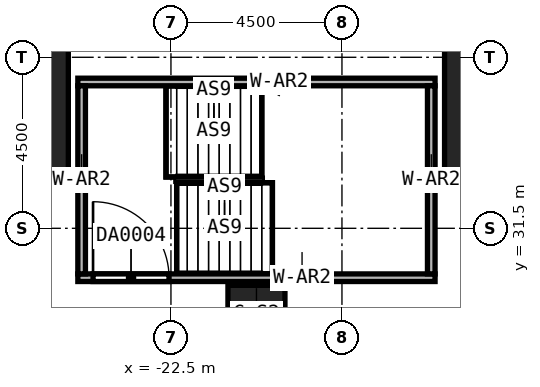
"""IFC4 building model, lengths in metres.
Left out: names, types, materials, properties, quantities, classifications, styles, units other than length and angle.
Written with IfcOpenShell. Run it as: python <this file> out.ifc"""

import sys

from ifc_helpers import new_model, si_unit, direction, frame, frame_2d, origin, origin_2d, place, context, subcontext, project, spatial, rectangle, extrude, element, fill, save


model = new_model("IFC4")
c1 = context("Model", 3, precision=1e-05, world=origin(), true_north=direction((0.0, 1.0)))
c2 = subcontext(c1, "Body", "Model", "MODEL_VIEW")
j1 = project(units=[si_unit("LENGTHUNIT", "METRE"), si_unit("PLANEANGLEUNIT", "RADIAN")], contexts=[c1])
p1 = place(None, origin())
s1 = spatial("IfcSite", under=j1, at=p1, CompositionType="ELEMENT")
p2 = place(p1, origin())
s2 = spatial("IfcBuilding", under=s1, at=p2, CompositionType="ELEMENT")
p3 = place(p2, frame((0.0, 0.0, 25.0)))
s3 = spatial("IfcBuildingStorey", under=s2, at=p3, CompositionType="ELEMENT", Elevation=25.0)
for number, where, z_axis, x_axis in (
    (1, (-27.0, 36.0, 0.0), (0.0, 0.0, 1.0), (1.0, 0.0, 0.0)),
    (2, (-13.5, 36.0, 0.0), (0.0, 0.0, 1.0), (1.0, 0.0, 0.0)),
):
    element("IfcColumn", number, at=place(p3, frame(where, z_axis=z_axis, x_axis=x_axis)), inside=s3, PredefinedType="COLUMN", context=c2, shape_type="SweptSolid", body=[
        extrude(rectangle(XDim=3.6, YDim=6.0, at=origin_2d()), origin(), (0.0, 0.0, 1.0), 6.0),
    ])
p4 = place(p3, frame((-20.25, 29.25, 0.0), z_axis=(0.0, 0.0, 1.0), x_axis=(1.0, 0.0, 0.0)))
e3 = element("IfcColumn", 3, at=p4, inside=s3, PredefinedType="COLUMN", context=c2, shape_type="SweptSolid", body=[
    extrude(rectangle(XDim=1.5, YDim=1.5, at=origin_2d()), origin(), (0.0, 0.0, 1.0), 6.0),
])
p5 = place(p3, frame((-24.95, 30.2, 0.0), z_axis=(0.0, 0.0, 1.0), x_axis=(1.0, 0.0, 0.0)))
e4 = element("IfcWall", 4, at=p5, inside=s3, PredefinedType="SOLIDWALL", context=c2, shape_type="SweptSolid", body=[
    extrude(rectangle(XDim=9.4, YDim=0.2, at=frame_2d((4.7, 0.0))), origin(), (0.0, 0.0, 1.0), 6.0),
])
p6 = place(p5, frame((0.4, 0.0, 0.0)))
e5 = element("IfcOpeningElement", 5, at=p6, cuts=e4, PredefinedType="OPENING", context=c2, shape_type="SweptSolid", body=[
    extrude(rectangle(XDim=2.0, YDim=2.4, at=frame_2d((1.0, 1.2))), frame((0.0, 0.1, 0.0), z_axis=(0.0, -1.0, 0.0), x_axis=(1.0, 0.0, 0.0)), (0.0, 0.0, 1.0), 0.2),
])
p7 = place(p3, frame((-24.95, 35.35, 0.0), z_axis=(0.0, 0.0, 1.0), x_axis=(1.0, 0.0, 0.0)))
e6 = element("IfcWall", 6, at=p7, inside=s3, PredefinedType="SOLIDWALL", context=c2, shape_type="SweptSolid", body=[
    extrude(rectangle(XDim=9.4, YDim=0.2, at=frame_2d((4.7, 0.0))), origin(), (0.0, 0.0, 1.0), 6.0),
])
for number, where, z_axis, x_axis in (
    (7, (-24.85, 30.3, 0.0), (0.0, 0.0, 1.0), (0.0, 1.0, 0.0)),
    (8, (-15.65, 30.3, 0.0), (0.0, 0.0, 1.0), (0.0, 1.0, 0.0)),
):
    element("IfcWall", number, at=place(p3, frame(where, z_axis=z_axis, x_axis=x_axis)), inside=s3, PredefinedType="SOLIDWALL", context=c2, shape_type="SweptSolid", body=[
        extrude(rectangle(XDim=4.95, YDim=0.2, at=frame_2d((2.475, 0.0))), origin(), (0.0, 0.0, 1.0), 6.0),
    ])
p8 = place(p6, origin())
e9 = element("IfcDoor", 9, at=p8, inside=s3, OperationType="DOUBLE_DOOR_SINGLE_SWING", PredefinedType="DOOR", context=c2, shape_type="SweptSolid", body=[
    extrude(rectangle(XDim=2.0, YDim=2.4, at=frame_2d((1.0, 1.2))), frame((0.0, 0.025, 0.0), z_axis=(0.0, -1.0, 0.0), x_axis=(1.0, 0.0, 0.0)), (0.0, 0.0, 1.0), 0.05),
])
fill(e5, e9)
save(model, sys.argv[1])
